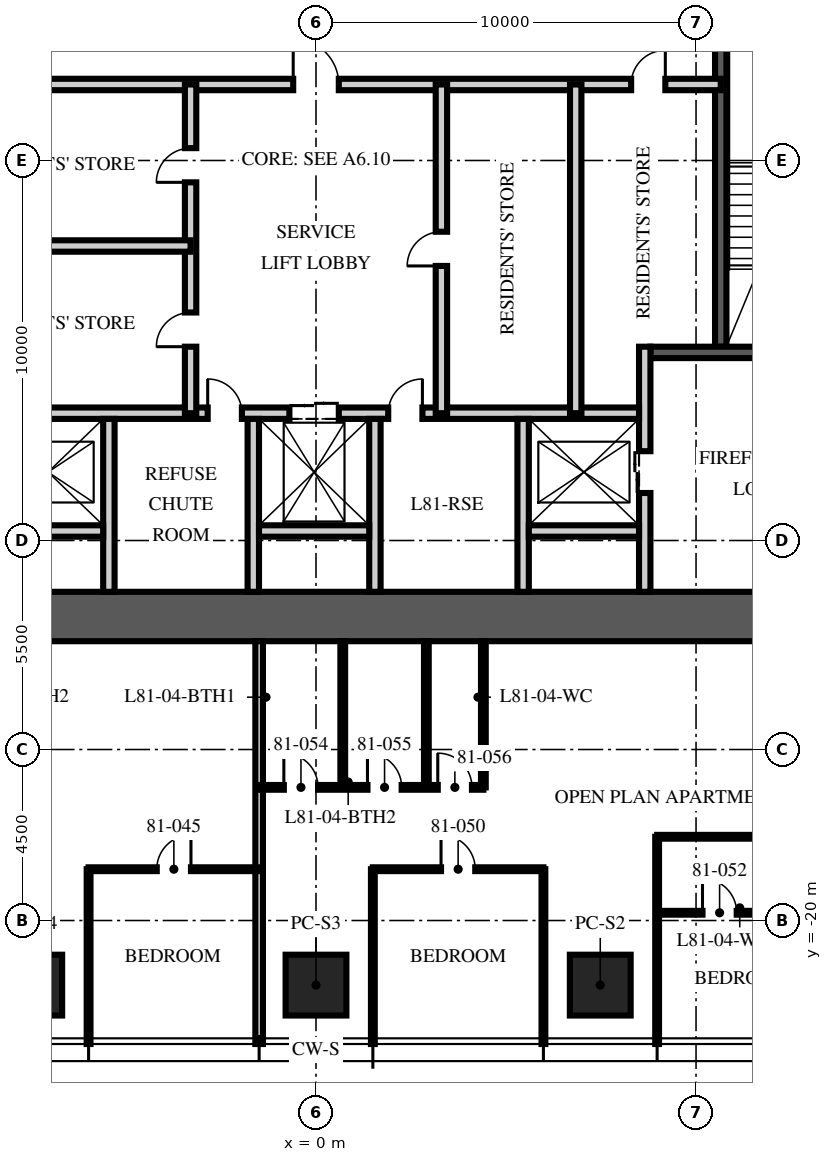
"""IFC4 building model, lengths in metres.
Left out: names, types, materials, properties, quantities, classifications, styles, units other than length and angle.
Written with IfcOpenShell. Run it as: python <this file> out.ifc"""

import sys

from ifc_helpers import new_model, si_unit, direction, frame, frame_2d, origin, origin_2d, place, context, subcontext, project, spatial, rectangle, extrude, element, fill, save


model = new_model("IFC4")
c1 = context("Model", 3, precision=1e-05, world=origin(), true_north=direction((0.0, 1.0)))
c2 = subcontext(c1, "Body", "Model", "MODEL_VIEW")
j1 = project(units=[si_unit("LENGTHUNIT", "METRE"), si_unit("PLANEANGLEUNIT", "RADIAN")], contexts=[c1])
p1 = place(None, origin())
s1 = spatial("IfcSite", under=j1, at=p1, CompositionType="ELEMENT")
p2 = place(p1, origin())
s2 = spatial("IfcBuilding", under=s1, at=p2, CompositionType="ELEMENT")
p3 = place(p2, frame((0.0, 0.0, 323.25)))
s3 = spatial("IfcBuildingStorey", under=s2, at=p3, CompositionType="ELEMENT", Elevation=323.25)
p4 = place(p3, frame((-15.5, -12.0, -0.25), z_axis=(0.0, 0.0, 1.0), x_axis=(1.0, 0.0, 0.0)))
e1 = element("IfcWall", 1, at=p4, inside=s3, PredefinedType="SHEAR", context=c2, shape_type="SweptSolid", body=[
    extrude(rectangle(XDim=31.0, YDim=1.3, at=frame_2d((15.5, 0.0))), origin(), (0.0, 0.0, 1.0), 3.75),
])
for number, where, z_axis, x_axis in (
    (2, (7.48, -21.7, 0.0), (0.0, 0.0, 1.0), (1.0, 0.0, 0.0)),
    (3, (0.0, -21.7, 0.0), (0.0, 0.0, 1.0), (1.0, 0.0, 0.0)),
    (4, (-7.48, -21.7, 0.0), (0.0, 0.0, 1.0), (1.0, 0.0, 0.0)),
):
    element("IfcColumn", number, at=place(p3, frame(where, z_axis=z_axis, x_axis=x_axis)), inside=s3, PredefinedType="COLUMN", context=c2, shape_type="SweptSolid", body=[
        extrude(rectangle(XDim=1.6, YDim=1.6, at=origin_2d()), origin(), (0.0, 0.0, 1.0), 3.75),
    ])
p5 = place(p3, frame((10.65, -4.9, 0.0), z_axis=(0.0, 0.0, 1.0), x_axis=(0.0, 1.0, 0.0)))
e5 = element("IfcWall", 5, at=p5, inside=s3, PredefinedType="SOLIDWALL", context=c2, shape_type="SweptSolid", body=[
    extrude(rectangle(XDim=10.1, YDim=0.3, at=frame_2d((5.05, 0.0))), origin(), (0.0, 0.0, 1.0), 3.5),
])
p6 = place(p3, frame((14.85, -5.05, 0.0), z_axis=(0.0, 0.0, 1.0), x_axis=(-1.0, 0.0, 0.0)))
e6 = element("IfcWall", 6, at=p6, inside=s3, PredefinedType="SOLIDWALL", context=c2, shape_type="SweptSolid", body=[
    extrude(rectangle(XDim=6.05, YDim=0.3, at=frame_2d((3.025, 0.0))), origin(), (0.0, 0.0, 1.0), 3.5),
])
p7 = place(p6, frame((1.425, 0.0, 0.0)))
e7 = element("IfcOpeningElement", 7, at=p7, cuts=e6, PredefinedType="OPENING", context=c2, shape_type="SweptSolid", body=[
    extrude(rectangle(XDim=1.2, YDim=2.1, at=frame_2d((0.6, 1.05))), frame((0.0, 0.16, 0.0), z_axis=(0.0, -1.0, 0.0), x_axis=(1.0, 0.0, 0.0)), (0.0, 0.0, 1.0), 0.32),
])
p8 = place(p3, frame((8.65, -11.35, 0.0), z_axis=(0.0, 0.0, 1.0), x_axis=(0.0, 1.0, 0.0)))
e8 = element("IfcWall", 8, at=p8, inside=s3, PredefinedType="PARTITIONING", context=c2, shape_type="SweptSolid", body=[
    extrude(rectangle(XDim=6.45, YDim=0.3, at=frame_2d((3.225, 0.0))), origin(), (0.0, 0.0, 1.0), 3.5),
])
p9 = place(p8, frame((2.6, 0.0, 0.0)))
e9 = element("IfcOpeningElement", 9, at=p9, cuts=e8, PredefinedType="OPENING", context=c2, shape_type="SweptSolid", body=[
    extrude(rectangle(XDim=1.1, YDim=2.1, at=frame_2d((0.55, 1.05))), frame((0.0, 0.16, 0.0), z_axis=(0.0, -1.0, 0.0), x_axis=(1.0, 0.0, 0.0)), (0.0, 0.0, 1.0), 0.32),
])
p10 = place(p3, frame((-8.5, -6.65, 0.0), z_axis=(0.0, 0.0, 1.0), x_axis=(1.0, 0.0, 0.0)))
e10 = element("IfcWall", 10, at=p10, inside=s3, PredefinedType="PARTITIONING", context=c2, shape_type="SweptSolid", body=[
    extrude(rectangle(XDim=17.0, YDim=0.3, at=frame_2d((8.5, 0.0))), origin(), (0.0, 0.0, 1.0), 3.5),
])
p11 = place(p10, frame((7.8, 0.0, 0.0)))
e11 = element("IfcOpeningElement", 11, at=p11, cuts=e10, PredefinedType="OPENING", context=c2, shape_type="SweptSolid", body=[
    extrude(rectangle(XDim=1.3, YDim=2.4, at=frame_2d((0.65, 1.2))), frame((0.0, 0.16, 0.0), z_axis=(0.0, -1.0, 0.0), x_axis=(1.0, 0.0, 0.0)), (0.0, 0.0, 1.0), 0.32),
])
p12 = place(p10, frame((5.65, 0.0, 0.0)))
e12 = element("IfcOpeningElement", 12, at=p12, cuts=e10, PredefinedType="OPENING", context=c2, shape_type="SweptSolid", body=[
    extrude(rectangle(XDim=0.9, YDim=2.1, at=frame_2d((0.45, 1.05))), frame((0.0, 0.16, 0.0), z_axis=(0.0, -1.0, 0.0), x_axis=(1.0, 0.0, 0.0)), (0.0, 0.0, 1.0), 0.32),
])
p13 = place(p10, frame((10.4, 0.0, 0.0)))
e13 = element("IfcOpeningElement", 13, at=p13, cuts=e10, PredefinedType="OPENING", context=c2, shape_type="SweptSolid", body=[
    extrude(rectangle(XDim=0.9, YDim=2.1, at=frame_2d((0.45, 1.05))), frame((0.0, 0.16, 0.0), z_axis=(0.0, -1.0, 0.0), x_axis=(1.0, 0.0, 0.0)), (0.0, 0.0, 1.0), 0.32),
])
for number, where, z_axis, x_axis in (
    (14, (-5.45, -11.35, 0.0), (0.0, 0.0, 1.0), (0.0, 1.0, 0.0)),
    (15, (-1.65, -11.35, 0.0), (0.0, 0.0, 1.0), (0.0, 1.0, 0.0)),
    (16, (1.55, -11.35, 0.0), (0.0, 0.0, 1.0), (0.0, 1.0, 0.0)),
    (17, (5.45, -11.35, 0.0), (0.0, 0.0, 1.0), (0.0, 1.0, 0.0)),
):
    element("IfcWall", number, at=place(p3, frame(where, z_axis=z_axis, x_axis=x_axis)), inside=s3, PredefinedType="PARTITIONING", context=c2, shape_type="SweptSolid", body=[
        extrude(rectangle(XDim=4.55, YDim=0.3, at=frame_2d((2.275, 0.0))), origin(), (0.0, 0.0, 1.0), 3.5),
    ])
for number, where, z_axis, x_axis in (
    (18, (-8.5, -9.75, 0.0), (0.0, 0.0, 1.0), (1.0, 0.0, 0.0)),
    (19, (-1.5, -9.75, 0.0), (0.0, 0.0, 1.0), (1.0, 0.0, 0.0)),
    (20, (5.6, -9.75, 0.0), (0.0, 0.0, 1.0), (1.0, 0.0, 0.0)),
):
    element("IfcWall", number, at=place(p3, frame(where, z_axis=z_axis, x_axis=x_axis)), inside=s3, PredefinedType="PARTITIONING", context=c2, shape_type="SweptSolid", body=[
        extrude(rectangle(XDim=2.9, YDim=0.3, at=frame_2d((1.45, 0.0))), origin(), (0.0, 0.0, 1.0), 3.5),
    ])
p14 = place(p3, frame((-10.65, 2.0, 0.0), z_axis=(0.0, 0.0, 1.0), x_axis=(1.0, 0.0, 0.0)))
e21 = element("IfcWall", 21, at=p14, inside=s3, PredefinedType="PARTITIONING", context=c2, shape_type="SweptSolid", body=[
    extrude(rectangle(XDim=21.3, YDim=0.3, at=frame_2d((10.65, 0.0))), origin(), (0.0, 0.0, 1.0), 3.5),
])
p15 = place(p14, frame((10.05, 0.0, 0.0)))
e22 = element("IfcOpeningElement", 22, at=p15, cuts=e21, PredefinedType="OPENING", context=c2, shape_type="SweptSolid", body=[
    extrude(rectangle(XDim=1.2, YDim=2.1, at=frame_2d((0.6, 1.05))), frame((0.0, 0.16, 0.0), z_axis=(0.0, -1.0, 0.0), x_axis=(1.0, 0.0, 0.0)), (0.0, 0.0, 1.0), 0.32),
])
p16 = place(p14, frame((18.942, 0.0, 0.0)))
e23 = element("IfcOpeningElement", 23, at=p16, cuts=e21, PredefinedType="OPENING", context=c2, shape_type="SweptSolid", body=[
    extrude(rectangle(XDim=0.9, YDim=2.1, at=frame_2d((0.45, 1.05))), frame((0.0, 0.16, 0.0), z_axis=(0.0, -1.0, 0.0), x_axis=(1.0, 0.0, 0.0)), (0.0, 0.0, 1.0), 0.32),
])
p17 = place(p3, frame((-3.3, -6.65, 0.0), z_axis=(0.0, 0.0, 1.0), x_axis=(0.0, 1.0, 0.0)))
e24 = element("IfcWall", 24, at=p17, inside=s3, PredefinedType="PARTITIONING", context=c2, shape_type="SweptSolid", body=[
    extrude(rectangle(XDim=8.65, YDim=0.3, at=frame_2d((4.325, 0.0))), origin(), (0.0, 0.0, 1.0), 3.5),
])
p18 = place(p17, frame((1.75, 0.0, 0.0)))
e25 = element("IfcOpeningElement", 25, at=p18, cuts=e24, PredefinedType="OPENING", context=c2, shape_type="SweptSolid", body=[
    extrude(rectangle(XDim=0.9, YDim=2.1, at=frame_2d((0.45, 1.05))), frame((0.0, 0.16, 0.0), z_axis=(0.0, -1.0, 0.0), x_axis=(1.0, 0.0, 0.0)), (0.0, 0.0, 1.0), 0.32),
])
p19 = place(p17, frame((6.075, 0.0, 0.0)))
e26 = element("IfcOpeningElement", 26, at=p19, cuts=e24, PredefinedType="OPENING", context=c2, shape_type="SweptSolid", body=[
    extrude(rectangle(XDim=0.9, YDim=2.1, at=frame_2d((0.45, 1.05))), frame((0.0, 0.16, 0.0), z_axis=(0.0, -1.0, 0.0), x_axis=(1.0, 0.0, 0.0)), (0.0, 0.0, 1.0), 0.32),
])
p20 = place(p3, frame((3.3, -6.65, 0.0), z_axis=(0.0, 0.0, 1.0), x_axis=(0.0, 1.0, 0.0)))
e27 = element("IfcWall", 27, at=p20, inside=s3, PredefinedType="PARTITIONING", context=c2, shape_type="SweptSolid", body=[
    extrude(rectangle(XDim=8.65, YDim=0.3, at=frame_2d((4.325, 0.0))), origin(), (0.0, 0.0, 1.0), 3.5),
])
p21 = place(p20, frame((3.875, 0.0, 0.0)))
e28 = element("IfcOpeningElement", 28, at=p21, cuts=e27, PredefinedType="OPENING", context=c2, shape_type="SweptSolid", body=[
    extrude(rectangle(XDim=0.9, YDim=2.1, at=frame_2d((0.45, 1.05))), frame((0.0, 0.16, 0.0), z_axis=(0.0, -1.0, 0.0), x_axis=(1.0, 0.0, 0.0)), (0.0, 0.0, 1.0), 0.32),
])
p22 = place(p3, frame((-10.65, -2.25, 0.0), z_axis=(0.0, 0.0, 1.0), x_axis=(1.0, 0.0, 0.0)))
e29 = element("IfcWall", 29, at=p22, inside=s3, PredefinedType="PARTITIONING", context=c2, shape_type="SweptSolid", body=[
    extrude(rectangle(XDim=7.35, YDim=0.3, at=frame_2d((3.675, 0.0))), origin(), (0.0, 0.0, 1.0), 3.5),
])
p23 = place(p3, frame((6.834, -6.65, 0.0), z_axis=(0.0, 0.0, 1.0), x_axis=(0.0, 1.0, 0.0)))
e30 = element("IfcWall", 30, at=p23, inside=s3, PredefinedType="PARTITIONING", context=c2, shape_type="SweptSolid", body=[
    extrude(rectangle(XDim=8.65, YDim=0.3, at=frame_2d((4.325, 0.0))), origin(), (0.0, 0.0, 1.0), 3.5),
])
p24 = place(p3, frame((-5.984, -18.65, 0.0), z_axis=(0.0, 0.0, 1.0), x_axis=(0.0, -1.0, 0.0)))
e31 = element("IfcWall", 31, at=p24, inside=s3, PredefinedType="PARTITIONING", context=c2, shape_type="SweptSolid", body=[
    extrude(rectangle(XDim=4.6, YDim=0.1, at=frame_2d((2.3, 0.0))), origin(), (0.0, 0.0, 1.0), 3.01),
])
p25 = place(p3, frame((-1.496, -12.65, 0.0), z_axis=(0.0, 0.0, 1.0), x_axis=(0.0, -1.0, 0.0)))
e32 = element("IfcWall", 32, at=p25, inside=s3, PredefinedType="PARTITIONING", context=c2, shape_type="SweptSolid", body=[
    extrude(rectangle(XDim=10.6, YDim=0.2, at=frame_2d((5.3, 0.0))), origin(), (0.0, 0.0, 1.0), 3.01),
])
for number, where, z_axis, x_axis in (
    (33, (1.496, -18.65, 0.0), (0.0, 0.0, 1.0), (0.0, -1.0, 0.0)),
    (34, (5.984, -18.65, 0.0), (0.0, 0.0, 1.0), (0.0, -1.0, 0.0)),
):
    element("IfcWall", number, at=place(p3, frame(where, z_axis=z_axis, x_axis=x_axis)), inside=s3, PredefinedType="PARTITIONING", context=c2, shape_type="SweptSolid", body=[
        extrude(rectangle(XDim=4.6, YDim=0.1, at=frame_2d((2.3, 0.0))), origin(), (0.0, 0.0, 1.0), 3.01),
    ])
p26 = place(p3, frame((8.976, -17.796, 0.0), z_axis=(0.0, 0.0, 1.0), x_axis=(0.0, -1.0, 0.0)))
e35 = element("IfcWall", 35, at=p26, inside=s3, PredefinedType="PARTITIONING", context=c2, shape_type="SweptSolid", body=[
    extrude(rectangle(XDim=5.454, YDim=0.1, at=frame_2d((2.727, 0.0))), origin(), (0.0, 0.0, 1.0), 3.01),
])
p27 = place(p3, frame((-5.984, -18.65, 0.0), z_axis=(0.0, 0.0, 1.0), x_axis=(1.0, 0.0, 0.0)))
e36 = element("IfcWall", 36, at=p27, inside=s3, PredefinedType="PARTITIONING", context=c2, shape_type="SweptSolid", body=[
    extrude(rectangle(XDim=4.488, YDim=0.1, at=frame_2d((2.244, 0.0))), origin(), (0.0, 0.0, 1.0), 2.91),
])
p28 = place(p27, frame((1.794, 0.0, 0.0)))
e37 = element("IfcOpeningElement", 37, at=p28, cuts=e36, PredefinedType="OPENING", context=c2, shape_type="SweptSolid", body=[
    extrude(rectangle(XDim=0.9, YDim=2.1, at=frame_2d((0.45, 1.05))), frame((0.0, 0.06, 0.0), z_axis=(0.0, -1.0, 0.0), x_axis=(1.0, 0.0, 0.0)), (0.0, 0.0, 1.0), 0.12),
])
p29 = place(p3, frame((1.496, -18.65, 0.0), z_axis=(0.0, 0.0, 1.0), x_axis=(1.0, 0.0, 0.0)))
e38 = element("IfcWall", 38, at=p29, inside=s3, PredefinedType="PARTITIONING", context=c2, shape_type="SweptSolid", body=[
    extrude(rectangle(XDim=4.488, YDim=0.1, at=frame_2d((2.244, 0.0))), origin(), (0.0, 0.0, 1.0), 2.91),
])
p30 = place(p29, frame((1.794, 0.0, 0.0)))
e39 = element("IfcOpeningElement", 39, at=p30, cuts=e38, PredefinedType="OPENING", context=c2, shape_type="SweptSolid", body=[
    extrude(rectangle(XDim=0.9, YDim=2.1, at=frame_2d((0.45, 1.05))), frame((0.0, 0.06, 0.0), z_axis=(0.0, -1.0, 0.0), x_axis=(1.0, 0.0, 0.0)), (0.0, 0.0, 1.0), 0.12),
])
p31 = place(p3, frame((8.976, -19.796, 0.0), z_axis=(0.0, 0.0, 1.0), x_axis=(1.0, 0.0, 0.0)))
e40 = element("IfcWall", 40, at=p31, inside=s3, PredefinedType="PARTITIONING", context=c2, shape_type="SweptSolid", body=[
    extrude(rectangle(XDim=4.488, YDim=0.1, at=frame_2d((2.244, 0.0))), origin(), (0.0, 0.0, 1.0), 2.91),
])
p32 = place(p31, frame((3.438, 0.0, 0.0)))
e41 = element("IfcOpeningElement", 41, at=p32, cuts=e40, PredefinedType="OPENING", context=c2, shape_type="SweptSolid", body=[
    extrude(rectangle(XDim=0.9, YDim=2.1, at=frame_2d((0.45, 1.05))), frame((0.0, 0.06, 0.0), z_axis=(0.0, -1.0, 0.0), x_axis=(1.0, 0.0, 0.0)), (0.0, 0.0, 1.0), 0.12),
])
p33 = place(p31, frame((1.194, 0.0, 0.0)))
e42 = element("IfcOpeningElement", 42, at=p33, cuts=e40, PredefinedType="OPENING", context=c2, shape_type="SweptSolid", body=[
    extrude(rectangle(XDim=0.9, YDim=2.1, at=frame_2d((0.45, 1.05))), frame((0.0, 0.06, 0.0), z_axis=(0.0, -1.0, 0.0), x_axis=(1.0, 0.0, 0.0)), (0.0, 0.0, 1.0), 0.12),
])
p34 = place(p3, frame((8.976, -17.796, 0.0), z_axis=(0.0, 0.0, 1.0), x_axis=(1.0, 0.0, 0.0)))
e43 = element("IfcWall", 43, at=p34, inside=s3, PredefinedType="PARTITIONING", context=c2, shape_type="SweptSolid", body=[
    extrude(rectangle(XDim=3.288, YDim=0.1, at=frame_2d((1.644, 0.0))), origin(), (0.0, 0.0, 1.0), 2.91),
])
p35 = place(p3, frame((-1.496, -16.496, 0.0), z_axis=(0.0, 0.0, 1.0), x_axis=(1.0, 0.0, 0.0)))
e44 = element("IfcWall", 44, at=p35, inside=s3, PredefinedType="PARTITIONING", context=c2, shape_type="SweptSolid", body=[
    extrude(rectangle(XDim=5.9, YDim=0.125, at=frame_2d((2.95, 0.0))), origin(), (0.0, 0.0, 1.0), 2.9),
])
p36 = place(p35, frame((0.65, 0.0, 0.0)))
e45 = element("IfcOpeningElement", 45, at=p36, cuts=e44, PredefinedType="OPENING", context=c2, shape_type="SweptSolid", body=[
    extrude(rectangle(XDim=0.9, YDim=2.1, at=frame_2d((0.45, 1.05))), frame((0.0, 0.073, 0.0), z_axis=(0.0, -1.0, 0.0), x_axis=(1.0, 0.0, 0.0)), (0.0, 0.0, 1.0), 0.145),
])
p37 = place(p35, frame((2.85, 0.0, 0.0)))
e46 = element("IfcOpeningElement", 46, at=p37, cuts=e44, PredefinedType="OPENING", context=c2, shape_type="SweptSolid", body=[
    extrude(rectangle(XDim=0.9, YDim=2.1, at=frame_2d((0.45, 1.05))), frame((0.0, 0.073, 0.0), z_axis=(0.0, -1.0, 0.0), x_axis=(1.0, 0.0, 0.0)), (0.0, 0.0, 1.0), 0.145),
])
p38 = place(p35, frame((4.7, 0.0, 0.0)))
e47 = element("IfcOpeningElement", 47, at=p38, cuts=e44, PredefinedType="OPENING", context=c2, shape_type="SweptSolid", body=[
    extrude(rectangle(XDim=0.9, YDim=2.1, at=frame_2d((0.45, 1.05))), frame((0.0, 0.073, 0.0), z_axis=(0.0, -1.0, 0.0), x_axis=(1.0, 0.0, 0.0)), (0.0, 0.0, 1.0), 0.145),
])
for number, where, z_axis, x_axis in (
    (48, (0.704, -12.65, 0.0), (0.0, 0.0, 1.0), (0.0, -1.0, 0.0)),
    (49, (2.904, -12.65, 0.0), (0.0, 0.0, 1.0), (0.0, -1.0, 0.0)),
    (50, (4.404, -12.65, 0.0), (0.0, 0.0, 1.0), (0.0, -1.0, 0.0)),
):
    element("IfcWall", number, at=place(p3, frame(where, z_axis=z_axis, x_axis=x_axis)), inside=s3, PredefinedType="PARTITIONING", context=c2, shape_type="SweptSolid", body=[
        extrude(rectangle(XDim=3.846, YDim=0.125, at=frame_2d((1.923, 0.0))), origin(), (0.0, 0.0, 1.0), 3.5),
    ])
p39 = place(p9, origin())
e51 = element("IfcDoor", 51, at=p39, inside=s3, OperationType="DOUBLE_DOOR_SLIDING", PredefinedType="DOOR", context=c2, shape_type="SweptSolid", body=[
    extrude(rectangle(XDim=1.1, YDim=2.1, at=frame_2d((0.55, 1.05))), frame((0.0, 0.025, 0.0), z_axis=(0.0, -1.0, 0.0), x_axis=(1.0, 0.0, 0.0)), (0.0, 0.0, 1.0), 0.05),
])
fill(e9, e51)
p40 = place(p11, origin())
e52 = element("IfcDoor", 52, at=p40, inside=s3, OperationType="DOUBLE_DOOR_SLIDING", PredefinedType="DOOR", context=c2, shape_type="SweptSolid", body=[
    extrude(rectangle(XDim=1.3, YDim=2.4, at=frame_2d((0.65, 1.2))), frame((0.0, 0.025, 0.0), z_axis=(0.0, -1.0, 0.0), x_axis=(1.0, 0.0, 0.0)), (0.0, 0.0, 1.0), 0.05),
])
fill(e11, e52)
p41 = place(p15, origin())
e53 = element("IfcDoor", 53, at=p41, inside=s3, OperationType="SINGLE_SWING_LEFT", PredefinedType="DOOR", context=c2, shape_type="SweptSolid", body=[
    extrude(rectangle(XDim=1.2, YDim=2.1, at=frame_2d((0.6, 1.05))), frame((0.0, 0.025, 0.0), z_axis=(0.0, -1.0, 0.0), x_axis=(1.0, 0.0, 0.0)), (0.0, 0.0, 1.0), 0.05),
])
fill(e22, e53)
p42 = place(p12, origin())
e54 = element("IfcDoor", 54, at=p42, inside=s3, OperationType="SINGLE_SWING_LEFT", PredefinedType="DOOR", context=c2, shape_type="SweptSolid", body=[
    extrude(rectangle(XDim=0.9, YDim=2.1, at=frame_2d((0.45, 1.05))), frame((0.0, 0.025, 0.0), z_axis=(0.0, -1.0, 0.0), x_axis=(1.0, 0.0, 0.0)), (0.0, 0.0, 1.0), 0.05),
])
fill(e12, e54)
p43 = place(p13, origin())
e55 = element("IfcDoor", 55, at=p43, inside=s3, OperationType="SINGLE_SWING_RIGHT", PredefinedType="DOOR", context=c2, shape_type="SweptSolid", body=[
    extrude(rectangle(XDim=0.9, YDim=2.1, at=frame_2d((0.45, 1.05))), frame((0.0, 0.025, 0.0), z_axis=(0.0, -1.0, 0.0), x_axis=(1.0, 0.0, 0.0)), (0.0, 0.0, 1.0), 0.05),
])
fill(e13, e55)
p44 = place(p18, origin())
e56 = element("IfcDoor", 56, at=p44, inside=s3, OperationType="SINGLE_SWING_LEFT", PredefinedType="DOOR", context=c2, shape_type="SweptSolid", body=[
    extrude(rectangle(XDim=0.9, YDim=2.1, at=frame_2d((0.45, 1.05))), frame((0.0, 0.025, 0.0), z_axis=(0.0, -1.0, 0.0), x_axis=(1.0, 0.0, 0.0)), (0.0, 0.0, 1.0), 0.05),
])
fill(e25, e56)
p45 = place(p19, origin())
e57 = element("IfcDoor", 57, at=p45, inside=s3, OperationType="SINGLE_SWING_LEFT", PredefinedType="DOOR", context=c2, shape_type="SweptSolid", body=[
    extrude(rectangle(XDim=0.9, YDim=2.1, at=frame_2d((0.45, 1.05))), frame((0.0, 0.025, 0.0), z_axis=(0.0, -1.0, 0.0), x_axis=(1.0, 0.0, 0.0)), (0.0, 0.0, 1.0), 0.05),
])
fill(e26, e57)
p46 = place(p21, origin())
e58 = element("IfcDoor", 58, at=p46, inside=s3, OperationType="SINGLE_SWING_LEFT", PredefinedType="DOOR", context=c2, shape_type="SweptSolid", body=[
    extrude(rectangle(XDim=0.9, YDim=2.1, at=frame_2d((0.45, 1.05))), frame((0.0, 0.025, 0.0), z_axis=(0.0, -1.0, 0.0), x_axis=(1.0, 0.0, 0.0)), (0.0, 0.0, 1.0), 0.05),
])
fill(e28, e58)
p47 = place(p16, origin())
e59 = element("IfcDoor", 59, at=p47, inside=s3, OperationType="SINGLE_SWING_RIGHT", PredefinedType="DOOR", context=c2, shape_type="SweptSolid", body=[
    extrude(rectangle(XDim=0.9, YDim=2.1, at=frame_2d((0.45, 1.05))), frame((0.0, 0.025, 0.0), z_axis=(0.0, -1.0, 0.0), x_axis=(1.0, 0.0, 0.0)), (0.0, 0.0, 1.0), 0.05),
])
fill(e23, e59)
p48 = place(p28, origin())
e60 = element("IfcDoor", 60, at=p48, inside=s3, OperationType="SINGLE_SWING_RIGHT", PredefinedType="DOOR", context=c2, shape_type="SweptSolid", body=[
    extrude(rectangle(XDim=0.9, YDim=2.1, at=frame_2d((0.45, 1.05))), frame((0.0, 0.025, 0.0), z_axis=(0.0, -1.0, 0.0), x_axis=(1.0, 0.0, 0.0)), (0.0, 0.0, 1.0), 0.05),
])
fill(e37, e60)
p49 = place(p30, origin())
e61 = element("IfcDoor", 61, at=p49, inside=s3, OperationType="SINGLE_SWING_LEFT", PredefinedType="DOOR", context=c2, shape_type="SweptSolid", body=[
    extrude(rectangle(XDim=0.9, YDim=2.1, at=frame_2d((0.45, 1.05))), frame((0.0, 0.025, 0.0), z_axis=(0.0, -1.0, 0.0), x_axis=(1.0, 0.0, 0.0)), (0.0, 0.0, 1.0), 0.05),
])
fill(e39, e61)
p50 = place(p33, origin())
e62 = element("IfcDoor", 62, at=p50, inside=s3, OperationType="SINGLE_SWING_LEFT", PredefinedType="DOOR", context=c2, shape_type="SweptSolid", body=[
    extrude(rectangle(XDim=0.9, YDim=2.1, at=frame_2d((0.45, 1.05))), frame((0.0, 0.025, 0.0), z_axis=(0.0, -1.0, 0.0), x_axis=(1.0, 0.0, 0.0)), (0.0, 0.0, 1.0), 0.05),
])
fill(e42, e62)
p51 = place(p36, origin())
e63 = element("IfcDoor", 63, at=p51, inside=s3, OperationType="SINGLE_SWING_LEFT", PredefinedType="DOOR", context=c2, shape_type="SweptSolid", body=[
    extrude(rectangle(XDim=0.9, YDim=2.1, at=frame_2d((0.45, 1.05))), frame((0.0, 0.025, 0.0), z_axis=(0.0, -1.0, 0.0), x_axis=(1.0, 0.0, 0.0)), (0.0, 0.0, 1.0), 0.05),
])
fill(e45, e63)
p52 = place(p37, origin())
e64 = element("IfcDoor", 64, at=p52, inside=s3, OperationType="SINGLE_SWING_LEFT", PredefinedType="DOOR", context=c2, shape_type="SweptSolid", body=[
    extrude(rectangle(XDim=0.9, YDim=2.1, at=frame_2d((0.45, 1.05))), frame((0.0, 0.025, 0.0), z_axis=(0.0, -1.0, 0.0), x_axis=(1.0, 0.0, 0.0)), (0.0, 0.0, 1.0), 0.05),
])
fill(e46, e64)
p53 = place(p38, origin())
e65 = element("IfcDoor", 65, at=p53, inside=s3, OperationType="SINGLE_SWING_LEFT", PredefinedType="DOOR", context=c2, shape_type="SweptSolid", body=[
    extrude(rectangle(XDim=0.9, YDim=2.1, at=frame_2d((0.45, 1.05))), frame((0.0, 0.025, 0.0), z_axis=(0.0, -1.0, 0.0), x_axis=(1.0, 0.0, 0.0)), (0.0, 0.0, 1.0), 0.05),
])
fill(e47, e65)
save(model, sys.argv[1])
